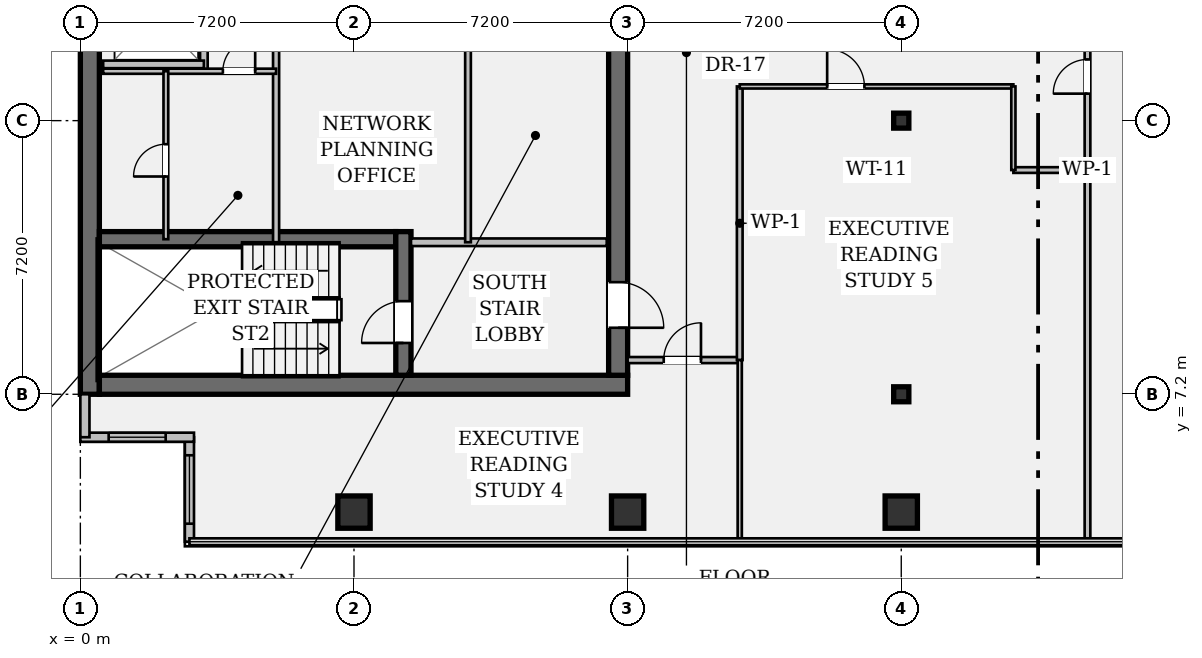
"""IFC4 building model, lengths in metres.
Left out: names, types, materials, properties, quantities, classifications, styles, units other than length and angle.
Written with IfcOpenShell. Run it as: python <this file> out.ifc"""

import sys

from ifc_helpers import new_model, si_unit, direction, frame, frame_2d, origin, origin_2d, place, context, subcontext, project, spatial, rectangle, hollow_rectangle, i_section, extrude, element, fill, save


model = new_model("IFC4")
c1 = context("Model", 3, precision=1e-05, world=origin(), true_north=direction((0.0, 1.0)))
c2 = subcontext(c1, "Body", "Model", "MODEL_VIEW")
j1 = project(units=[si_unit("LENGTHUNIT", "METRE"), si_unit("PLANEANGLEUNIT", "RADIAN")], contexts=[c1])
p1 = place(None, origin())
s1 = spatial("IfcSite", under=j1, at=p1, CompositionType="ELEMENT")
p2 = place(p1, origin())
s2 = spatial("IfcBuilding", under=s1, at=p2, CompositionType="ELEMENT")
p3 = place(p2, frame((0.0, 0.0, 176.75)))
s3 = spatial("IfcBuildingStorey", under=s2, at=p3, CompositionType="ELEMENT", Elevation=176.75)
p4 = place(p3, frame((0.25, 7.2, 0.0), z_axis=(0.0, 0.0, 1.0), x_axis=(0.0, 1.0, 0.0)))
e1 = element("IfcWall", 1, at=p4, inside=s3, PredefinedType="SHEAR", context=c2, shape_type="SweptSolid", body=[
    extrude(rectangle(XDim=28.8, YDim=0.5, at=frame_2d((14.4, 0.0))), origin(), (0.0, 0.0, 1.0), 3.24),
])
p5 = place(p3, frame((0.5, 7.45, 0.0), z_axis=(0.0, 0.0, 1.0), x_axis=(1.0, 0.0, 0.0)))
e2 = element("IfcWall", 2, at=p5, inside=s3, PredefinedType="SHEAR", context=c2, shape_type="SweptSolid", body=[
    extrude(rectangle(XDim=13.9, YDim=0.5, at=frame_2d((6.95, 0.0))), origin(), (0.0, 0.0, 1.0), 3.24),
])
p6 = place(p3, frame((14.15, 35.5, 0.0), z_axis=(0.0, 0.0, 1.0), x_axis=(0.0, -1.0, 0.0)))
e3 = element("IfcWall", 3, at=p6, inside=s3, PredefinedType="SHEAR", context=c2, shape_type="SweptSolid", body=[
    extrude(rectangle(XDim=27.8, YDim=0.5, at=frame_2d((13.9, 0.0))), origin(), (0.0, 0.0, 1.0), 3.24),
])
p7 = place(p6, frame((1.4, 0.0, 0.0)))
e4 = element("IfcOpeningElement", 4, at=p7, cuts=e3, PredefinedType="OPENING", context=c2, shape_type="SweptSolid", body=[
    extrude(rectangle(XDim=1.2, YDim=2.15, at=frame_2d((0.6, 1.075))), frame((0.0, 0.262, 0.0), z_axis=(0.0, -1.0, 0.0), x_axis=(1.0, 0.0, 0.0)), (0.0, 0.0, 1.0), 0.524),
])
p8 = place(p6, frame((25.35, 0.0, 0.0)))
e5 = element("IfcOpeningElement", 5, at=p8, cuts=e3, PredefinedType="OPENING", context=c2, shape_type="SweptSolid", body=[
    extrude(rectangle(XDim=1.2, YDim=2.15, at=frame_2d((0.6, 1.075))), frame((0.0, 0.262, 0.0), z_axis=(0.0, -1.0, 0.0), x_axis=(1.0, 0.0, 0.0)), (0.0, 0.0, 1.0), 0.524),
])
p9 = place(p6, frame((14.7, 0.0, 0.0)))
e6 = element("IfcOpeningElement", 6, at=p9, cuts=e3, PredefinedType="OPENING", context=c2, shape_type="SweptSolid", body=[
    extrude(rectangle(XDim=1.6, YDim=2.2, at=frame_2d((0.8, 1.1))), frame((0.0, 0.262, 0.0), z_axis=(0.0, -1.0, 0.0), x_axis=(1.0, 0.0, 0.0)), (0.0, 0.0, 1.0), 0.524),
])
p10 = place(p3, frame((0.5, 11.28, 0.0), z_axis=(0.0, 0.0, 1.0), x_axis=(1.0, 0.0, 0.0)))
e7 = element("IfcWall", 7, at=p10, inside=s3, PredefinedType="SHEAR", context=c2, shape_type="SweptSolid", body=[
    extrude(rectangle(XDim=7.8, YDim=0.4, at=frame_2d((3.9, 0.0))), origin(), (0.0, 0.0, 1.0), 3.24),
])
p11 = place(p3, frame((8.5, 7.7, 0.0), z_axis=(0.0, 0.0, 1.0), x_axis=(0.0, 1.0, 0.0)))
e8 = element("IfcWall", 8, at=p11, inside=s3, PredefinedType="SHEAR", context=c2, shape_type="SweptSolid", body=[
    extrude(rectangle(XDim=3.78, YDim=0.4, at=frame_2d((1.89, 0.0))), origin(), (0.0, 0.0, 1.0), 3.24),
])
p12 = place(p11, frame((0.85, 0.0, 0.0)))
e9 = element("IfcOpeningElement", 9, at=p12, cuts=e8, PredefinedType="OPENING", context=c2, shape_type="SweptSolid", body=[
    extrude(rectangle(XDim=1.1, YDim=2.15, at=frame_2d((0.55, 1.075))), frame((0.0, 0.212, 0.0), z_axis=(0.0, -1.0, 0.0), x_axis=(1.0, 0.0, 0.0)), (0.0, 0.0, 1.0), 0.424),
])
for number, where, z_axis, x_axis in (
    (10, (7.2, 4.1, 0.0), (0.0, 0.0, 1.0), (1.0, 0.0, 0.0)),
    (11, (14.4, 4.1, 0.0), (0.0, 0.0, 1.0), (1.0, 0.0, 0.0)),
    (12, (21.6, 4.1, 0.0), (0.0, 0.0, 1.0), (1.0, 0.0, 0.0)),
):
    element("IfcColumn", number, at=place(p3, frame(where, z_axis=z_axis, x_axis=x_axis)), inside=s3, PredefinedType="COLUMN", context=c2, shape_type="SweptSolid", body=[
        extrude(hollow_rectangle(XDim=0.85, YDim=0.85, WallThickness=0.05, at=origin_2d()), origin(), (0.0, 0.0, 1.0), 3.24),
    ])
for number, where, z_axis, x_axis in (
    (13, (21.6, 7.2, 0.0), (0.0, 0.0, 1.0), (1.0, 0.0, 0.0)),
    (14, (21.6, 14.4, 0.0), (0.0, 0.0, 1.0), (1.0, 0.0, 0.0)),
):
    element("IfcColumn", number, at=place(p3, frame(where, z_axis=z_axis, x_axis=x_axis)), inside=s3, PredefinedType="COLUMN", context=c2, shape_type="SweptSolid", body=[
        extrude(i_section(OverallWidth=0.399, OverallDepth=0.394, WebThickness=0.023, FlangeThickness=0.037, FilletRadius=0.018, at=origin_2d()), origin(), (0.0, 0.0, 1.0), 3.24),
    ])
p13 = place(p3, frame((2.87, 3.32, 0.0), z_axis=(0.0, 0.0, 1.0), x_axis=(0.0, 1.0, 0.0)))
e15 = element("IfcWall", 15, at=p13, inside=s3, PredefinedType="STANDARD", context=c2, shape_type="SweptSolid", body=[
    extrude(rectangle(XDim=2.75, YDim=0.24, at=frame_2d((1.375, 0.0))), origin(), (0.0, 0.0, 1.0), 3.24),
])
p14 = place(p13, frame((0.475, 0.0, 0.95)))
e16 = element("IfcOpeningElement", 16, at=p14, cuts=e15, PredefinedType="OPENING", context=c2, shape_type="SweptSolid", body=[
    extrude(rectangle(XDim=1.8, YDim=1.35, at=frame_2d((0.9, 0.675))), frame((0.0, 0.132, 0.0), z_axis=(0.0, -1.0, 0.0), x_axis=(1.0, 0.0, 0.0)), (0.0, 0.0, 1.0), 0.264),
])
p15 = place(p3, frame((2.99, 6.07, 0.0), z_axis=(0.0, 0.0, 1.0), x_axis=(-1.0, 0.0, 0.0)))
e17 = element("IfcWall", 17, at=p15, inside=s3, PredefinedType="STANDARD", context=c2, shape_type="SweptSolid", body=[
    extrude(rectangle(XDim=2.99, YDim=0.24, at=frame_2d((1.495, 0.0))), origin(), (0.0, 0.0, 1.0), 3.24),
])
p16 = place(p15, frame((0.745, 0.0, 0.95)))
e18 = element("IfcOpeningElement", 18, at=p16, cuts=e17, PredefinedType="OPENING", context=c2, shape_type="SweptSolid", body=[
    extrude(rectangle(XDim=1.5, YDim=1.8, at=frame_2d((0.75, 0.9))), frame((0.0, 0.132, 0.0), z_axis=(0.0, -1.0, 0.0), x_axis=(1.0, 0.0, 0.0)), (0.0, 0.0, 1.0), 0.264),
])
p17 = place(p3, frame((0.12, 6.07, 0.0), z_axis=(0.0, 0.0, 1.0), x_axis=(0.0, 1.0, 0.0)))
e19 = element("IfcWall", 19, at=p17, inside=s3, PredefinedType="STANDARD", context=c2, shape_type="SweptSolid", body=[
    extrude(rectangle(XDim=1.13, YDim=0.24, at=frame_2d((0.565, 0.0))), origin(), (0.0, 0.0, 1.0), 3.24),
])
p18 = place(p3, frame((8.7, 11.2, 0.0), z_axis=(0.0, 0.0, 1.0), x_axis=(1.0, 0.0, 0.0)))
e20 = element("IfcWall", 20, at=p18, inside=s3, PredefinedType="PARTITIONING", context=c2, shape_type="SweptSolid", body=[
    extrude(rectangle(XDim=5.15, YDim=0.2, at=frame_2d((2.575, 0.0))), origin(), (0.0, 0.0, 1.0), 3.24),
])
p19 = place(p3, frame((3.25, 15.7, 0.0), z_axis=(0.0, 0.0, 1.0), x_axis=(0.0, 1.0, 0.0)))
e21 = element("IfcWall", 21, at=p19, inside=s3, PredefinedType="PARTITIONING", context=c2, shape_type="SweptSolid", body=[
    extrude(rectangle(XDim=13.08, YDim=0.2, at=frame_2d((6.54, 0.0))), origin(), (0.0, 0.0, 1.0), 3.24),
])
p20 = place(p19, frame((0.9, 0.0, 0.0)))
e22 = element("IfcOpeningElement", 22, at=p20, cuts=e21, PredefinedType="OPENING", context=c2, shape_type="SweptSolid", body=[
    extrude(rectangle(XDim=1.1, YDim=2.2, at=frame_2d((0.55, 1.1))), frame((0.0, 0.112, 0.0), z_axis=(0.0, -1.0, 0.0), x_axis=(1.0, 0.0, 0.0)), (0.0, 0.0, 1.0), 0.224),
])
p21 = place(p19, frame((3.5, 0.0, 0.0)))
e23 = element("IfcOpeningElement", 23, at=p21, cuts=e21, PredefinedType="OPENING", context=c2, shape_type="SweptSolid", body=[
    extrude(rectangle(XDim=1.1, YDim=2.2, at=frame_2d((0.55, 1.1))), frame((0.0, 0.112, 0.0), z_axis=(0.0, -1.0, 0.0), x_axis=(1.0, 0.0, 0.0)), (0.0, 0.0, 1.0), 0.224),
])
p22 = place(p19, frame((7.2, 0.0, 0.0)))
e24 = element("IfcOpeningElement", 24, at=p22, cuts=e21, PredefinedType="OPENING", context=c2, shape_type="SweptSolid", body=[
    extrude(rectangle(XDim=1.1, YDim=2.2, at=frame_2d((0.55, 1.1))), frame((0.0, 0.112, 0.0), z_axis=(0.0, -1.0, 0.0), x_axis=(1.0, 0.0, 0.0)), (0.0, 0.0, 1.0), 0.224),
])
p23 = place(p19, frame((9.8, 0.0, 0.0)))
e25 = element("IfcOpeningElement", 25, at=p23, cuts=e21, PredefinedType="OPENING", context=c2, shape_type="SweptSolid", body=[
    extrude(rectangle(XDim=1.1, YDim=2.2, at=frame_2d((0.55, 1.1))), frame((0.0, 0.112, 0.0), z_axis=(0.0, -1.0, 0.0), x_axis=(1.0, 0.0, 0.0)), (0.0, 0.0, 1.0), 0.224),
])
p24 = place(p3, frame((0.6, 15.88, 0.0), z_axis=(0.0, 0.0, 1.0), x_axis=(1.0, 0.0, 0.0)))
e26 = element("IfcWall", 26, at=p24, inside=s3, PredefinedType="PARTITIONING", context=c2, shape_type="SweptSolid", body=[
    extrude(rectangle(XDim=2.65, YDim=0.2, at=frame_2d((1.325, 0.0))), origin(), (0.0, 0.0, 1.0), 3.24),
])
p25 = place(p3, frame((5.15, 11.2, 0.0), z_axis=(0.0, 0.0, 1.0), x_axis=(0.0, 1.0, 0.0)))
e27 = element("IfcWall", 27, at=p25, inside=s3, PredefinedType="PARTITIONING", context=c2, shape_type="SweptSolid", body=[
    extrude(rectangle(XDim=6.6, YDim=0.16, at=frame_2d((3.3, 0.0))), origin(), (0.0, 0.0, 1.0), 3.24),
])
p26 = place(p3, frame((10.2, 11.2, 0.0), z_axis=(0.0, 0.0, 1.0), x_axis=(0.0, 1.0, 0.0)))
e28 = element("IfcWall", 28, at=p26, inside=s3, PredefinedType="PARTITIONING", context=c2, shape_type="SweptSolid", body=[
    extrude(rectangle(XDim=6.6, YDim=0.15, at=frame_2d((3.3, 0.0))), origin(), (0.0, 0.0, 1.0), 3.24),
])
p27 = place(p3, frame((0.6, 15.7, 0.0), z_axis=(0.0, 0.0, 1.0), x_axis=(1.0, 0.0, 0.0)))
e29 = element("IfcWall", 29, at=p27, inside=s3, PredefinedType="PARTITIONING", context=c2, shape_type="SweptSolid", body=[
    extrude(rectangle(XDim=4.55, YDim=0.135, at=frame_2d((2.275, 0.0))), origin(), (0.0, 0.0, 1.0), 3.24),
])
p28 = place(p27, frame((3.15, 0.0, 0.0)))
e30 = element("IfcOpeningElement", 30, at=p28, cuts=e29, PredefinedType="OPENING", context=c2, shape_type="SweptSolid", body=[
    extrude(rectangle(XDim=0.85, YDim=2.15, at=frame_2d((0.425, 1.075))), frame((0.0, 0.08, 0.0), z_axis=(0.0, -1.0, 0.0), x_axis=(1.0, 0.0, 0.0)), (0.0, 0.0, 1.0), 0.159),
])
p29 = place(p3, frame((2.25, 11.28, 0.0), z_axis=(0.0, 0.0, 1.0), x_axis=(0.0, 1.0, 0.0)))
e31 = element("IfcWall", 31, at=p29, inside=s3, PredefinedType="PARTITIONING", context=c2, shape_type="SweptSolid", body=[
    extrude(rectangle(XDim=4.42, YDim=0.125, at=frame_2d((2.21, 0.0))), origin(), (0.0, 0.0, 1.0), 3.24),
])
p30 = place(p29, frame((1.65, 0.0, 0.0)))
e32 = element("IfcOpeningElement", 32, at=p30, cuts=e31, PredefinedType="OPENING", context=c2, shape_type="SweptSolid", body=[
    extrude(rectangle(XDim=0.85, YDim=2.15, at=frame_2d((0.425, 1.075))), frame((0.0, 0.074, 0.0), z_axis=(0.0, -1.0, 0.0), x_axis=(1.0, 0.0, 0.0)), (0.0, 0.0, 1.0), 0.149),
])
p31 = place(p3, frame((14.4, 8.1, 0.0), z_axis=(0.0, 0.0, 1.0), x_axis=(1.0, 0.0, 0.0)))
e33 = element("IfcWall", 33, at=p31, inside=s3, PredefinedType="PARTITIONING", context=c2, shape_type="SweptSolid", body=[
    extrude(rectangle(XDim=2.95, YDim=0.16, at=frame_2d((1.475, 0.0))), origin(), (0.0, 0.0, 1.0), 2.808),
])
p32 = place(p31, frame((0.95, 0.0, 0.0)))
e34 = element("IfcOpeningElement", 34, at=p32, cuts=e33, PredefinedType="OPENING", context=c2, shape_type="SweptSolid", body=[
    extrude(rectangle(XDim=0.98, YDim=2.15, at=frame_2d((0.49, 1.075))), frame((0.0, 0.092, 0.0), z_axis=(0.0, -1.0, 0.0), x_axis=(1.0, 0.0, 0.0)), (0.0, 0.0, 1.0), 0.184),
])
p33 = place(p3, frame((17.35, 8.1, 0.0), z_axis=(0.0, 0.0, 1.0), x_axis=(0.0, 1.0, 0.0)))
e35 = element("IfcWall", 35, at=p33, inside=s3, PredefinedType="PARTITIONING", context=c2, shape_type="SweptSolid", body=[
    extrude(rectangle(XDim=7.2, YDim=0.15, at=frame_2d((3.6, 0.0))), origin(), (0.0, 0.0, 1.0), 2.603),
])
p34 = place(p3, frame((17.35, 15.3, 0.0), z_axis=(0.0, 0.0, 1.0), x_axis=(1.0, 0.0, 0.0)))
e36 = element("IfcWall", 36, at=p34, inside=s3, PredefinedType="PARTITIONING", context=c2, shape_type="SweptSolid", body=[
    extrude(rectangle(XDim=7.2, YDim=0.11, at=frame_2d((3.6, 0.0))), origin(), (0.0, 0.0, 1.0), 2.603),
])
p35 = place(p34, frame((2.3, 0.0, 0.0)))
e37 = element("IfcOpeningElement", 37, at=p35, cuts=e36, PredefinedType="OPENING", context=c2, shape_type="SweptSolid", body=[
    extrude(rectangle(XDim=0.98, YDim=2.15, at=frame_2d((0.49, 1.075))), frame((0.0, 0.067, 0.0), z_axis=(0.0, -1.0, 0.0), x_axis=(1.0, 0.0, 0.0)), (0.0, 0.0, 1.0), 0.134),
])
p36 = place(p3, frame((24.55, 13.1, 0.0), z_axis=(0.0, 0.0, 1.0), x_axis=(1.0, 0.0, 0.0)))
e38 = element("IfcWall", 38, at=p36, inside=s3, PredefinedType="PARTITIONING", context=c2, shape_type="SweptSolid", body=[
    extrude(rectangle(XDim=1.95, YDim=0.15, at=frame_2d((0.975, 0.0))), origin(), (0.0, 0.0, 1.0), 2.808),
])
p37 = place(p3, frame((24.55, 13.1, 0.0), z_axis=(0.0, 0.0, 1.0), x_axis=(0.0, 1.0, 0.0)))
e39 = element("IfcWall", 39, at=p37, inside=s3, PredefinedType="PARTITIONING", context=c2, shape_type="SweptSolid", body=[
    extrude(rectangle(XDim=2.2, YDim=0.11, at=frame_2d((1.1, 0.0))), origin(), (0.0, 0.0, 1.0), 2.603),
])
p38 = place(p3, frame((26.5, 3.32, 0.0), z_axis=(0.0, 0.0, 1.0), x_axis=(0.0, 1.0, 0.0)))
e40 = element("IfcWall", 40, at=p38, inside=s3, PredefinedType="PARTITIONING", context=c2, shape_type="SweptSolid", body=[
    extrude(rectangle(XDim=21.76, YDim=0.15, at=frame_2d((10.88, 0.0))), origin(), (0.0, 0.0, 1.0), 2.603),
])
p39 = place(p38, frame((11.79, 0.0, 0.0)))
e41 = element("IfcOpeningElement", 41, at=p39, cuts=e40, PredefinedType="OPENING", context=c2, shape_type="SweptSolid", body=[
    extrude(rectangle(XDim=0.9, YDim=2.15, at=frame_2d((0.45, 1.075))), frame((0.0, 0.087, 0.0), z_axis=(0.0, -1.0, 0.0), x_axis=(1.0, 0.0, 0.0)), (0.0, 0.0, 1.0), 0.174),
])
p40 = place(p38, frame((13.46, 0.0, 0.0)))
e42 = element("IfcOpeningElement", 42, at=p40, cuts=e40, PredefinedType="OPENING", context=c2, shape_type="SweptSolid", body=[
    extrude(rectangle(XDim=0.9, YDim=2.15, at=frame_2d((0.45, 1.075))), frame((0.0, 0.087, 0.0), z_axis=(0.0, -1.0, 0.0), x_axis=(1.0, 0.0, 0.0)), (0.0, 0.0, 1.0), 0.174),
])
p41 = place(p3, frame((17.35, 3.32, 0.0), z_axis=(0.0, 0.0, 1.0), x_axis=(0.0, 1.0, 0.0)))
e43 = element("IfcWall", 43, at=p41, inside=s3, PredefinedType="PARTITIONING", context=c2, shape_type="SweptSolid", body=[
    extrude(rectangle(XDim=4.78, YDim=0.11, at=frame_2d((2.39, 0.0))), origin(), (0.0, 0.0, 1.0), 2.603),
])
p42 = place(p14, origin())
e44 = element("IfcWindow", 44, at=p42, inside=s3, PartitioningType="SINGLE_PANEL", PredefinedType="WINDOW", context=c2, shape_type="SweptSolid", body=[
    extrude(rectangle(XDim=1.8, YDim=1.35, at=frame_2d((0.9, 0.675))), frame((0.0, 0.03, 0.0), z_axis=(0.0, -1.0, 0.0), x_axis=(1.0, 0.0, 0.0)), (0.0, 0.0, 1.0), 0.06),
])
fill(e16, e44)
p43 = place(p16, origin())
e45 = element("IfcWindow", 45, at=p43, inside=s3, PartitioningType="SINGLE_PANEL", PredefinedType="WINDOW", context=c2, shape_type="SweptSolid", body=[
    extrude(rectangle(XDim=1.5, YDim=1.8, at=frame_2d((0.75, 0.9))), frame((0.0, 0.03, 0.0), z_axis=(0.0, -1.0, 0.0), x_axis=(1.0, 0.0, 0.0)), (0.0, 0.0, 1.0), 0.06),
])
fill(e18, e45)
p44 = place(p12, origin())
e46 = element("IfcDoor", 46, at=p44, inside=s3, OperationType="SINGLE_SWING_LEFT", PredefinedType="DOOR", context=c2, shape_type="SweptSolid", body=[
    extrude(rectangle(XDim=1.1, YDim=2.15, at=frame_2d((0.55, 1.075))), frame((0.0, 0.025, 0.0), z_axis=(0.0, -1.0, 0.0), x_axis=(1.0, 0.0, 0.0)), (0.0, 0.0, 1.0), 0.05),
])
fill(e9, e46)
p45 = place(p8, origin())
e47 = element("IfcDoor", 47, at=p45, inside=s3, OperationType="SINGLE_SWING_RIGHT", PredefinedType="DOOR", context=c2, shape_type="SweptSolid", body=[
    extrude(rectangle(XDim=1.2, YDim=2.15, at=frame_2d((0.6, 1.075))), frame((0.0, 0.025, 0.0), z_axis=(0.0, -1.0, 0.0), x_axis=(1.0, 0.0, 0.0)), (0.0, 0.0, 1.0), 0.05),
])
fill(e5, e47)
p46 = place(p28, origin())
e48 = element("IfcDoor", 48, at=p46, inside=s3, OperationType="SINGLE_SWING_RIGHT", PredefinedType="DOOR", context=c2, shape_type="SweptSolid", body=[
    extrude(rectangle(XDim=0.85, YDim=2.15, at=frame_2d((0.425, 1.075))), frame((0.0, 0.025, 0.0), z_axis=(0.0, -1.0, 0.0), x_axis=(1.0, 0.0, 0.0)), (0.0, 0.0, 1.0), 0.05),
])
fill(e30, e48)
p47 = place(p30, origin())
e49 = element("IfcDoor", 49, at=p47, inside=s3, OperationType="SINGLE_SWING_LEFT", PredefinedType="DOOR", context=c2, shape_type="SweptSolid", body=[
    extrude(rectangle(XDim=0.85, YDim=2.15, at=frame_2d((0.425, 1.075))), frame((0.0, 0.025, 0.0), z_axis=(0.0, -1.0, 0.0), x_axis=(1.0, 0.0, 0.0)), (0.0, 0.0, 1.0), 0.05),
])
fill(e32, e49)
p48 = place(p32, origin())
e50 = element("IfcDoor", 50, at=p48, inside=s3, OperationType="SINGLE_SWING_RIGHT", PredefinedType="DOOR", context=c2, shape_type="SweptSolid", body=[
    extrude(rectangle(XDim=0.98, YDim=2.15, at=frame_2d((0.49, 1.075))), frame((0.0, 0.025, 0.0), z_axis=(0.0, -1.0, 0.0), x_axis=(1.0, 0.0, 0.0)), (0.0, 0.0, 1.0), 0.05),
])
fill(e34, e50)
p49 = place(p35, origin())
e51 = element("IfcDoor", 51, at=p49, inside=s3, OperationType="SINGLE_SWING_LEFT", PredefinedType="DOOR", context=c2, shape_type="SweptSolid", body=[
    extrude(rectangle(XDim=0.98, YDim=2.15, at=frame_2d((0.49, 1.075))), frame((0.0, 0.025, 0.0), z_axis=(0.0, -1.0, 0.0), x_axis=(1.0, 0.0, 0.0)), (0.0, 0.0, 1.0), 0.05),
])
fill(e37, e51)
p50 = place(p39, origin())
e52 = element("IfcDoor", 52, at=p50, inside=s3, OperationType="SINGLE_SWING_LEFT", PredefinedType="DOOR", context=c2, shape_type="SweptSolid", body=[
    extrude(rectangle(XDim=0.9, YDim=2.15, at=frame_2d((0.45, 1.075))), frame((0.0, 0.025, 0.0), z_axis=(0.0, -1.0, 0.0), x_axis=(1.0, 0.0, 0.0)), (0.0, 0.0, 1.0), 0.05),
])
fill(e41, e52)
save(model, sys.argv[1])
